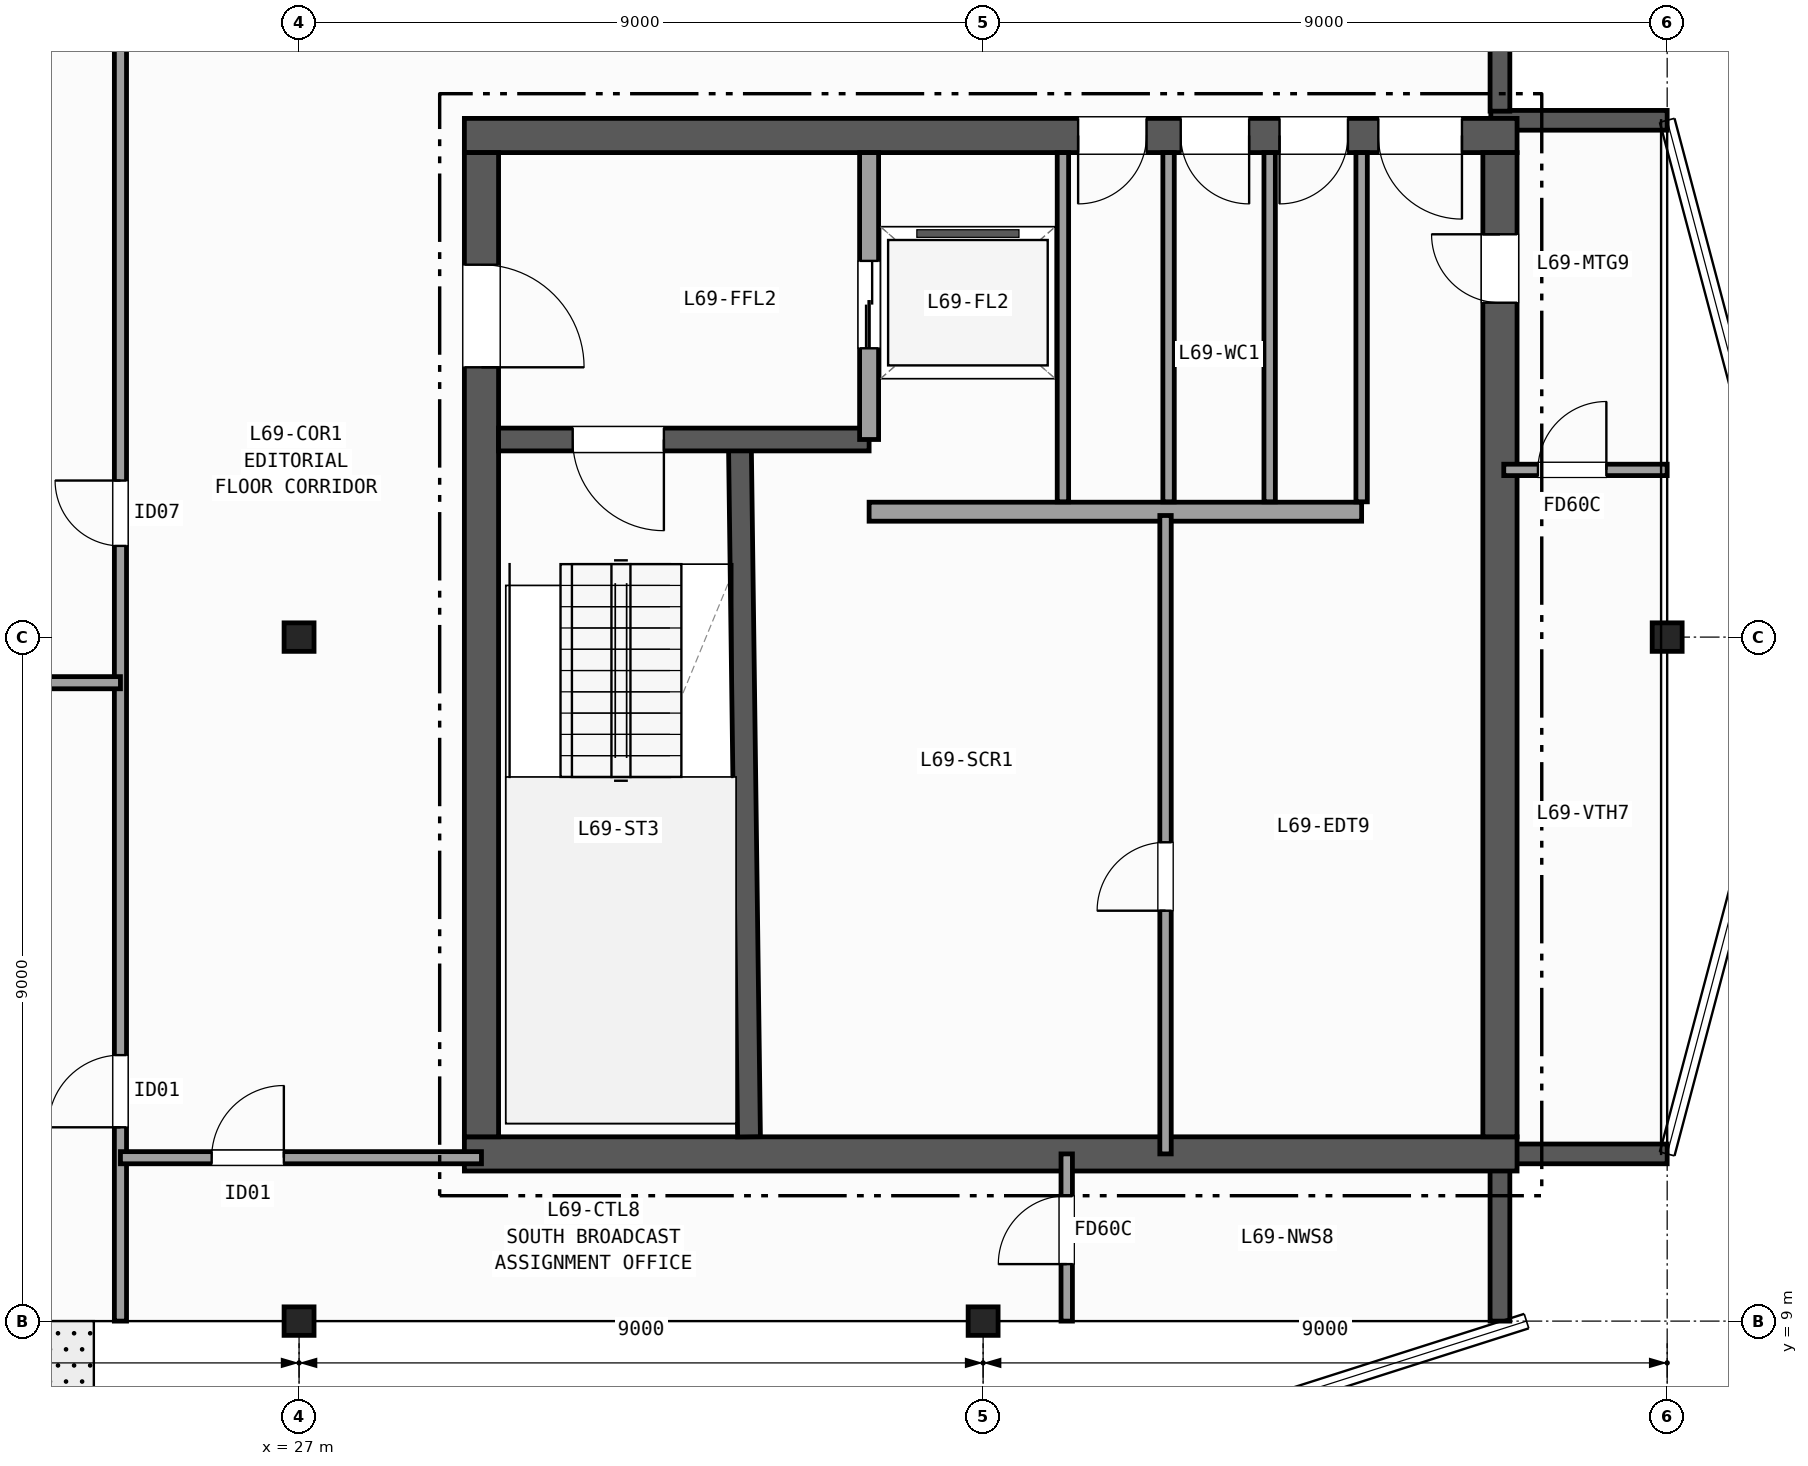
"""IFC4 building model, lengths in metres.
Left out: names, types, materials, properties, quantities, classifications, styles, units other than length and angle.
Written with IfcOpenShell. Run it as: python <this file> out.ifc"""

import sys

from ifc_helpers import new_model, si_unit, direction, frame, frame_2d, origin, origin_2d, place, context, subcontext, project, spatial, rectangle, i_section, extrude, element, fill, save


model = new_model("IFC4")
c1 = context("Model", 3, precision=1e-05, world=origin(), true_north=direction((0.0, 1.0)))
c2 = subcontext(c1, "Body", "Model", "MODEL_VIEW")
j1 = project(units=[si_unit("LENGTHUNIT", "METRE"), si_unit("PLANEANGLEUNIT", "RADIAN")], contexts=[c1])
p1 = place(None, origin())
s1 = spatial("IfcSite", under=j1, at=p1, CompositionType="ELEMENT")
p2 = place(p1, origin())
s2 = spatial("IfcBuilding", under=s1, at=p2, CompositionType="ELEMENT")
p3 = place(p2, frame((0.0, 0.0, 274.1)))
s3 = spatial("IfcBuildingStorey", under=s2, at=p3, CompositionType="ELEMENT", Elevation=274.1)
for number, where, z_axis, x_axis in (
    (1, (27.0, 9.0, 0.0), (0.0, 0.0, 1.0), (1.0, 0.0, 0.0)),
    (2, (27.0, 18.0, 0.0), (0.0, 0.0, 1.0), (1.0, 0.0, 0.0)),
    (3, (36.0, 9.0, 0.0), (0.0, 0.0, 1.0), (1.0, 0.0, 0.0)),
    (4, (45.0, 18.0, 0.0), (0.0, 0.0, 1.0), (1.0, 0.0, 0.0)),
):
    element("IfcColumn", number, at=place(p3, frame(where, z_axis=z_axis, x_axis=x_axis)), inside=s3, PredefinedType="COLUMN", context=c2, shape_type="SweptSolid", body=[
        extrude(i_section(OverallWidth=0.394, OverallDepth=0.375, WebThickness=0.017, FlangeThickness=0.028, FilletRadius=0.015, at=origin_2d()), origin(), (0.0, 0.0, 1.0), 3.7),
    ])
p4 = place(p3, frame((42.8, 9.0, 0.0), z_axis=(0.0, 0.0, 1.0), x_axis=(0.0, 1.0, 0.0)))
e5 = element("IfcWall", 5, at=p4, inside=s3, PredefinedType="SOLIDWALL", context=c2, shape_type="SweptSolid", body=[
    extrude(rectangle(XDim=2.08, YDim=0.26, at=frame_2d((1.04, 0.0))), origin(), (0.0, 0.0, 1.0), 3.42),
])
for number, where, z_axis, x_axis in (
    (6, (42.68, 11.2, 0.0), (0.0, 0.0, 1.0), (1.0, 0.0, 0.0)),
    (7, (45.0, 24.8, 0.0), (0.0, 0.0, 1.0), (-1.0, 0.0, 0.0)),
):
    element("IfcWall", number, at=place(p3, frame(where, z_axis=z_axis, x_axis=x_axis)), inside=s3, PredefinedType="SOLIDWALL", context=c2, shape_type="SweptSolid", body=[
        extrude(rectangle(XDim=2.32, YDim=0.26, at=frame_2d((1.16, 0.0))), origin(), (0.0, 0.0, 1.0), 3.42),
    ])
p5 = place(p3, frame((42.8, 24.92, 0.0), z_axis=(0.0, 0.0, 1.0), x_axis=(0.0, 1.0, 0.0)))
e8 = element("IfcWall", 8, at=p5, inside=s3, PredefinedType="SOLIDWALL", context=c2, shape_type="SweptSolid", body=[
    extrude(rectangle(XDim=2.08, YDim=0.26, at=frame_2d((1.04, 0.0))), origin(), (0.0, 0.0, 1.0), 3.42),
])
p6 = place(p3, frame((29.175, 11.2, 0.0), z_axis=(0.0, 0.0, 1.0), x_axis=(1.0, 0.0, 0.0)))
e9 = element("IfcWall", 9, at=p6, inside=s3, PredefinedType="SHEAR", context=c2, shape_type="SweptSolid", body=[
    extrude(rectangle(XDim=13.85, YDim=0.45, at=frame_2d((6.925, 0.0))), origin(), (0.0, 0.0, 1.0), 3.42),
])
p7 = place(p3, frame((43.025, 24.6, 0.0), z_axis=(0.0, 0.0, 1.0), x_axis=(-1.0, 0.0, 0.0)))
e10 = element("IfcWall", 10, at=p7, inside=s3, PredefinedType="SHEAR", context=c2, shape_type="SweptSolid", body=[
    extrude(rectangle(XDim=13.85, YDim=0.45, at=frame_2d((6.925, 0.0))), origin(), (0.0, 0.0, 1.0), 3.42),
])
p8 = place(p7, frame((0.725, 0.0, 0.0)))
e11 = element("IfcOpeningElement", 11, at=p8, cuts=e10, PredefinedType="OPENING", context=c2, shape_type="SweptSolid", body=[
    extrude(rectangle(XDim=1.1, YDim=2.15, at=frame_2d((0.55, 1.075))), frame((0.0, 0.235, 0.0), z_axis=(0.0, -1.0, 0.0), x_axis=(1.0, 0.0, 0.0)), (0.0, 0.0, 1.0), 0.47),
])
p9 = place(p7, frame((2.225, 0.0, 0.0)))
e12 = element("IfcOpeningElement", 12, at=p9, cuts=e10, PredefinedType="OPENING", context=c2, shape_type="SweptSolid", body=[
    extrude(rectangle(XDim=0.9, YDim=2.1, at=frame_2d((0.45, 1.05))), frame((0.0, 0.235, 0.0), z_axis=(0.0, -1.0, 0.0), x_axis=(1.0, 0.0, 0.0)), (0.0, 0.0, 1.0), 0.47),
])
p10 = place(p7, frame((3.525, 0.0, 0.0)))
e13 = element("IfcOpeningElement", 13, at=p10, cuts=e10, PredefinedType="OPENING", context=c2, shape_type="SweptSolid", body=[
    extrude(rectangle(XDim=0.9, YDim=2.1, at=frame_2d((0.45, 1.05))), frame((0.0, 0.235, 0.0), z_axis=(0.0, -1.0, 0.0), x_axis=(1.0, 0.0, 0.0)), (0.0, 0.0, 1.0), 0.47),
])
p11 = place(p7, frame((4.875, 0.0, 0.0)))
e14 = element("IfcOpeningElement", 14, at=p11, cuts=e10, PredefinedType="OPENING", context=c2, shape_type="SweptSolid", body=[
    extrude(rectangle(XDim=0.9, YDim=2.1, at=frame_2d((0.45, 1.05))), frame((0.0, 0.235, 0.0), z_axis=(0.0, -1.0, 0.0), x_axis=(1.0, 0.0, 0.0)), (0.0, 0.0, 1.0), 0.47),
])
p12 = place(p3, frame((29.4, 24.375, 0.0), z_axis=(0.0, 0.0, 1.0), x_axis=(0.0, -1.0, 0.0)))
e15 = element("IfcWall", 15, at=p12, inside=s3, PredefinedType="SHEAR", context=c2, shape_type="SweptSolid", body=[
    extrude(rectangle(XDim=12.95, YDim=0.45, at=frame_2d((6.475, 0.0))), origin(), (0.0, 0.0, 1.0), 3.42),
])
p13 = place(p12, frame((1.475, 0.0, 0.0)))
e16 = element("IfcOpeningElement", 16, at=p13, cuts=e15, PredefinedType="OPENING", context=c2, shape_type="SweptSolid", body=[
    extrude(rectangle(XDim=1.35, YDim=2.15, at=frame_2d((0.675, 1.075))), frame((0.0, 0.235, 0.0), z_axis=(0.0, -1.0, 0.0), x_axis=(1.0, 0.0, 0.0)), (0.0, 0.0, 1.0), 0.47),
])
p14 = place(p3, frame((42.8, 11.425, 0.0), z_axis=(0.0, 0.0, 1.0), x_axis=(0.0, 1.0, 0.0)))
e17 = element("IfcWall", 17, at=p14, inside=s3, PredefinedType="SHEAR", context=c2, shape_type="SweptSolid", body=[
    extrude(rectangle(XDim=12.95, YDim=0.45, at=frame_2d((6.475, 0.0))), origin(), (0.0, 0.0, 1.0), 3.42),
])
p15 = place(p14, frame((10.975, 0.0, 0.0)))
e18 = element("IfcOpeningElement", 18, at=p15, cuts=e17, PredefinedType="OPENING", context=c2, shape_type="SweptSolid", body=[
    extrude(rectangle(XDim=0.9, YDim=2.1, at=frame_2d((0.45, 1.05))), frame((0.0, 0.235, 0.0), z_axis=(0.0, -1.0, 0.0), x_axis=(1.0, 0.0, 0.0)), (0.0, 0.0, 1.0), 0.47),
])
p16 = place(p3, frame((32.92, 11.425, 0.0), z_axis=(0.0, 0.0, 1.0), x_axis=(-0.013135638869, 0.999913723774, 0.0)))
e19 = element("IfcWall", 19, at=p16, inside=s3, PredefinedType="SHEAR", context=c2, shape_type="SweptSolid", body=[
    extrude(rectangle(XDim=9.126, YDim=0.3, at=frame_2d((4.563, 0.0))), origin(), (0.0, 0.0, 1.0), 3.42),
])
p17 = place(p3, frame((34.5, 20.6, 0.0), z_axis=(0.0, 0.0, 1.0), x_axis=(-1.0, 0.0, 0.0)))
e20 = element("IfcWall", 20, at=p17, inside=s3, PredefinedType="SHEAR", context=c2, shape_type="SweptSolid", body=[
    extrude(rectangle(XDim=4.875, YDim=0.3, at=frame_2d((2.438, 0.0))), origin(), (0.0, 0.0, 1.0), 3.42),
])
p18 = place(p17, frame((2.7, 0.0, 0.0)))
e21 = element("IfcOpeningElement", 21, at=p18, cuts=e20, PredefinedType="OPENING", context=c2, shape_type="SweptSolid", body=[
    extrude(rectangle(XDim=1.2, YDim=2.15, at=frame_2d((0.6, 1.075))), frame((0.0, 0.16, 0.0), z_axis=(0.0, -1.0, 0.0), x_axis=(1.0, 0.0, 0.0)), (0.0, 0.0, 1.0), 0.32),
])
p19 = place(p3, frame((34.5, 20.6, 0.0), z_axis=(0.0, 0.0, 1.0), x_axis=(0.0, 1.0, 0.0)))
e22 = element("IfcWall", 22, at=p19, inside=s3, PredefinedType="PARTITIONING", context=c2, shape_type="SweptSolid", body=[
    extrude(rectangle(XDim=3.775, YDim=0.25, at=frame_2d((1.887, 0.0))), origin(), (0.0, 0.0, 1.0), 3.42),
])
p20 = place(p19, frame((1.2, 0.0, 0.0)))
e23 = element("IfcOpeningElement", 23, at=p20, cuts=e22, PredefinedType="OPENING", context=c2, shape_type="SweptSolid", body=[
    extrude(rectangle(XDim=1.15, YDim=2.15, at=frame_2d((0.575, 1.075))), frame((0.0, 0.135, 0.0), z_axis=(0.0, -1.0, 0.0), x_axis=(1.0, 0.0, 0.0)), (0.0, 0.0, 1.0), 0.27),
])
p21 = place(p3, frame((34.5, 19.65, 0.0), z_axis=(0.0, 0.0, 1.0), x_axis=(1.0, 0.0, 0.0)))
e24 = element("IfcWall", 24, at=p21, inside=s3, PredefinedType="PARTITIONING", context=c2, shape_type="SweptSolid", body=[
    extrude(rectangle(XDim=6.48, YDim=0.25, at=frame_2d((3.24, 0.0))), origin(), (0.0, 0.0, 1.0), 3.42),
])
p22 = place(p3, frame((38.4, 11.2, 0.0), z_axis=(0.0, 0.0, 1.0), x_axis=(0.0, 1.0, 0.0)))
e25 = element("IfcWall", 25, at=p22, inside=s3, PredefinedType="PARTITIONING", context=c2, shape_type="SweptSolid", body=[
    extrude(rectangle(XDim=8.4, YDim=0.15, at=frame_2d((4.2, 0.0))), origin(), (0.0, 0.0, 1.0), 3.42),
])
p23 = place(p22, frame((3.2, 0.0, 0.0)))
e26 = element("IfcOpeningElement", 26, at=p23, cuts=e25, PredefinedType="OPENING", context=c2, shape_type="SweptSolid", body=[
    extrude(rectangle(XDim=0.9, YDim=2.1, at=frame_2d((0.45, 1.05))), frame((0.0, 0.085, 0.0), z_axis=(0.0, -1.0, 0.0), x_axis=(1.0, 0.0, 0.0)), (0.0, 0.0, 1.0), 0.17),
])
for number, where, z_axis, x_axis in (
    (27, (37.05, 19.78, 0.0), (0.0, 0.0, 1.0), (0.0, 1.0, 0.0)),
    (28, (38.44, 19.78, 0.0), (0.0, 0.0, 1.0), (0.0, 1.0, 0.0)),
    (29, (39.77, 19.78, 0.0), (0.0, 0.0, 1.0), (0.0, 1.0, 0.0)),
    (30, (40.98, 19.78, 0.0), (0.0, 0.0, 1.0), (0.0, 1.0, 0.0)),
):
    element("IfcWall", number, at=place(p3, frame(where, z_axis=z_axis, x_axis=x_axis)), inside=s3, PredefinedType="PARTITIONING", context=c2, shape_type="SweptSolid", body=[
        extrude(rectangle(XDim=4.595, YDim=0.15, at=frame_2d((2.297, 0.0))), origin(), (0.0, 0.0, 1.0), 3.42),
    ])
p24 = place(p3, frame((24.65, 9.0, 0.0), z_axis=(0.0, 0.0, 1.0), x_axis=(0.0, 1.0, 0.0)))
e31 = element("IfcWall", 31, at=p24, inside=s3, PredefinedType="PARTITIONING", context=c2, shape_type="SweptSolid", body=[
    extrude(rectangle(XDim=19.2, YDim=0.16, at=frame_2d((9.6, 0.0))), origin(), (0.0, 0.0, 1.0), 2.707),
])
p25 = place(p24, frame((10.2, 0.0, 0.0)))
e32 = element("IfcOpeningElement", 32, at=p25, cuts=e31, PredefinedType="OPENING", context=c2, shape_type="SweptSolid", body=[
    extrude(rectangle(XDim=0.86, YDim=2.05, at=frame_2d((0.43, 1.025))), frame((0.0, 0.09, 0.0), z_axis=(0.0, -1.0, 0.0), x_axis=(1.0, 0.0, 0.0)), (0.0, 0.0, 1.0), 0.18),
])
p26 = place(p24, frame((2.55, 0.0, 0.0)))
e33 = element("IfcOpeningElement", 33, at=p26, cuts=e31, PredefinedType="OPENING", context=c2, shape_type="SweptSolid", body=[
    extrude(rectangle(XDim=0.95, YDim=2.1, at=frame_2d((0.475, 1.05))), frame((0.0, 0.09, 0.0), z_axis=(0.0, -1.0, 0.0), x_axis=(1.0, 0.0, 0.0)), (0.0, 0.0, 1.0), 0.18),
])
p27 = place(p3, frame((18.0, 17.4, 0.0), z_axis=(0.0, 0.0, 1.0), x_axis=(1.0, 0.0, 0.0)))
e34 = element("IfcWall", 34, at=p27, inside=s3, PredefinedType="PARTITIONING", context=c2, shape_type="SweptSolid", body=[
    extrude(rectangle(XDim=6.65, YDim=0.16, at=frame_2d((3.325, 0.0))), origin(), (0.0, 0.0, 1.0), 2.789),
])
p28 = place(p3, frame((24.65, 11.15, 0.0), z_axis=(0.0, 0.0, 1.0), x_axis=(1.0, 0.0, 0.0)))
e35 = element("IfcWall", 35, at=p28, inside=s3, PredefinedType="PARTITIONING", context=c2, shape_type="SweptSolid", body=[
    extrude(rectangle(XDim=4.75, YDim=0.16, at=frame_2d((2.375, 0.0))), origin(), (0.0, 0.0, 1.0), 2.792),
])
p29 = place(p28, frame((1.2, 0.0, 0.0)))
e36 = element("IfcOpeningElement", 36, at=p29, cuts=e35, PredefinedType="OPENING", context=c2, shape_type="SweptSolid", body=[
    extrude(rectangle(XDim=0.95, YDim=2.1, at=frame_2d((0.475, 1.05))), frame((0.0, 0.09, 0.0), z_axis=(0.0, -1.0, 0.0), x_axis=(1.0, 0.0, 0.0)), (0.0, 0.0, 1.0), 0.18),
])
p30 = place(p3, frame((37.1, 9.0, 0.0), z_axis=(0.0, 0.0, 1.0), x_axis=(0.0, 1.0, 0.0)))
e37 = element("IfcWall", 37, at=p30, inside=s3, PredefinedType="PARTITIONING", context=c2, shape_type="SweptSolid", body=[
    extrude(rectangle(XDim=2.2, YDim=0.15, at=frame_2d((1.1, 0.0))), origin(), (0.0, 0.0, 1.0), 3.42),
])
p31 = place(p30, frame((0.75, 0.0, 0.0)))
e38 = element("IfcOpeningElement", 38, at=p31, cuts=e37, PredefinedType="OPENING", context=c2, shape_type="SweptSolid", body=[
    extrude(rectangle(XDim=0.9, YDim=2.1, at=frame_2d((0.45, 1.05))), frame((0.0, 0.085, 0.0), z_axis=(0.0, -1.0, 0.0), x_axis=(1.0, 0.0, 0.0)), (0.0, 0.0, 1.0), 0.17),
])
p32 = place(p3, frame((42.85, 20.2, 0.0), z_axis=(0.0, 0.0, 1.0), x_axis=(1.0, 0.0, 0.0)))
e39 = element("IfcWall", 39, at=p32, inside=s3, PredefinedType="PARTITIONING", context=c2, shape_type="SweptSolid", body=[
    extrude(rectangle(XDim=2.15, YDim=0.15, at=frame_2d((1.075, 0.0))), origin(), (0.0, 0.0, 1.0), 3.42),
])
p33 = place(p32, frame((0.45, 0.0, 0.0)))
e40 = element("IfcOpeningElement", 40, at=p33, cuts=e39, PredefinedType="OPENING", context=c2, shape_type="SweptSolid", body=[
    extrude(rectangle(XDim=0.9, YDim=2.1, at=frame_2d((0.45, 1.05))), frame((0.0, 0.085, 0.0), z_axis=(0.0, -1.0, 0.0), x_axis=(1.0, 0.0, 0.0)), (0.0, 0.0, 1.0), 0.17),
])
p34 = place(p18, origin())
e41 = element("IfcDoor", 41, at=p34, inside=s3, OperationType="SINGLE_SWING_LEFT", PredefinedType="DOOR", context=c2, shape_type="SweptSolid", body=[
    extrude(rectangle(XDim=1.2, YDim=2.15, at=frame_2d((0.6, 1.075))), frame((0.0, 0.025, 0.0), z_axis=(0.0, -1.0, 0.0), x_axis=(1.0, 0.0, 0.0)), (0.0, 0.0, 1.0), 0.05),
])
fill(e21, e41)
p35 = place(p13, origin())
e42 = element("IfcDoor", 42, at=p35, inside=s3, OperationType="SINGLE_SWING_RIGHT", PredefinedType="DOOR", context=c2, shape_type="SweptSolid", body=[
    extrude(rectangle(XDim=1.35, YDim=2.15, at=frame_2d((0.675, 1.075))), frame((0.0, 0.025, 0.0), z_axis=(0.0, -1.0, 0.0), x_axis=(1.0, 0.0, 0.0)), (0.0, 0.0, 1.0), 0.05),
])
fill(e16, e42)
p36 = place(p15, origin())
e43 = element("IfcDoor", 43, at=p36, inside=s3, OperationType="SINGLE_SWING_RIGHT", PredefinedType="DOOR", context=c2, shape_type="SweptSolid", body=[
    extrude(rectangle(XDim=0.9, YDim=2.1, at=frame_2d((0.45, 1.05))), frame((0.0, 0.025, 0.0), z_axis=(0.0, -1.0, 0.0), x_axis=(1.0, 0.0, 0.0)), (0.0, 0.0, 1.0), 0.05),
])
fill(e18, e43)
p37 = place(p8, origin())
e44 = element("IfcDoor", 44, at=p37, inside=s3, OperationType="SINGLE_SWING_LEFT", PredefinedType="DOOR", context=c2, shape_type="SweptSolid", body=[
    extrude(rectangle(XDim=1.1, YDim=2.15, at=frame_2d((0.55, 1.075))), frame((0.0, 0.025, 0.0), z_axis=(0.0, -1.0, 0.0), x_axis=(1.0, 0.0, 0.0)), (0.0, 0.0, 1.0), 0.05),
])
fill(e11, e44)
p38 = place(p9, origin())
e45 = element("IfcDoor", 45, at=p38, inside=s3, OperationType="SINGLE_SWING_RIGHT", PredefinedType="DOOR", context=c2, shape_type="SweptSolid", body=[
    extrude(rectangle(XDim=0.9, YDim=2.1, at=frame_2d((0.45, 1.05))), frame((0.0, 0.025, 0.0), z_axis=(0.0, -1.0, 0.0), x_axis=(1.0, 0.0, 0.0)), (0.0, 0.0, 1.0), 0.05),
])
fill(e12, e45)
p39 = place(p10, origin())
e46 = element("IfcDoor", 46, at=p39, inside=s3, OperationType="SINGLE_SWING_LEFT", PredefinedType="DOOR", context=c2, shape_type="SweptSolid", body=[
    extrude(rectangle(XDim=0.9, YDim=2.1, at=frame_2d((0.45, 1.05))), frame((0.0, 0.025, 0.0), z_axis=(0.0, -1.0, 0.0), x_axis=(1.0, 0.0, 0.0)), (0.0, 0.0, 1.0), 0.05),
])
fill(e13, e46)
p40 = place(p11, origin())
e47 = element("IfcDoor", 47, at=p40, inside=s3, OperationType="SINGLE_SWING_RIGHT", PredefinedType="DOOR", context=c2, shape_type="SweptSolid", body=[
    extrude(rectangle(XDim=0.9, YDim=2.1, at=frame_2d((0.45, 1.05))), frame((0.0, 0.025, 0.0), z_axis=(0.0, -1.0, 0.0), x_axis=(1.0, 0.0, 0.0)), (0.0, 0.0, 1.0), 0.05),
])
fill(e14, e47)
p41 = place(p20, origin())
e48 = element("IfcDoor", 48, at=p41, inside=s3, OperationType="DOUBLE_DOOR_SLIDING", PredefinedType="DOOR", context=c2, shape_type="SweptSolid", body=[
    extrude(rectangle(XDim=1.15, YDim=2.15, at=frame_2d((0.575, 1.075))), frame((0.0, 0.025, 0.0), z_axis=(0.0, -1.0, 0.0), x_axis=(1.0, 0.0, 0.0)), (0.0, 0.0, 1.0), 0.05),
])
fill(e23, e48)
p42 = place(p23, origin())
e49 = element("IfcDoor", 49, at=p42, inside=s3, OperationType="SINGLE_SWING_LEFT", PredefinedType="DOOR", context=c2, shape_type="SweptSolid", body=[
    extrude(rectangle(XDim=0.9, YDim=2.1, at=frame_2d((0.45, 1.05))), frame((0.0, 0.025, 0.0), z_axis=(0.0, -1.0, 0.0), x_axis=(1.0, 0.0, 0.0)), (0.0, 0.0, 1.0), 0.05),
])
fill(e26, e49)
p43 = place(p25, origin())
e50 = element("IfcDoor", 50, at=p43, inside=s3, OperationType="SINGLE_SWING_RIGHT", PredefinedType="DOOR", context=c2, shape_type="SweptSolid", body=[
    extrude(rectangle(XDim=0.86, YDim=2.05, at=frame_2d((0.43, 1.025))), frame((0.0, 0.025, 0.0), z_axis=(0.0, -1.0, 0.0), x_axis=(1.0, 0.0, 0.0)), (0.0, 0.0, 1.0), 0.05),
])
fill(e32, e50)
p44 = place(p26, origin())
e51 = element("IfcDoor", 51, at=p44, inside=s3, OperationType="SINGLE_SWING_LEFT", PredefinedType="DOOR", context=c2, shape_type="SweptSolid", body=[
    extrude(rectangle(XDim=0.95, YDim=2.1, at=frame_2d((0.475, 1.05))), frame((0.0, 0.025, 0.0), z_axis=(0.0, -1.0, 0.0), x_axis=(1.0, 0.0, 0.0)), (0.0, 0.0, 1.0), 0.05),
])
fill(e33, e51)
p45 = place(p29, origin())
e52 = element("IfcDoor", 52, at=p45, inside=s3, OperationType="SINGLE_SWING_RIGHT", PredefinedType="DOOR", context=c2, shape_type="SweptSolid", body=[
    extrude(rectangle(XDim=0.95, YDim=2.1, at=frame_2d((0.475, 1.05))), frame((0.0, 0.025, 0.0), z_axis=(0.0, -1.0, 0.0), x_axis=(1.0, 0.0, 0.0)), (0.0, 0.0, 1.0), 0.05),
])
fill(e36, e52)
p46 = place(p31, origin())
e53 = element("IfcDoor", 53, at=p46, inside=s3, OperationType="SINGLE_SWING_LEFT", PredefinedType="DOOR", context=c2, shape_type="SweptSolid", body=[
    extrude(rectangle(XDim=0.9, YDim=2.1, at=frame_2d((0.45, 1.05))), frame((0.0, 0.025, 0.0), z_axis=(0.0, -1.0, 0.0), x_axis=(1.0, 0.0, 0.0)), (0.0, 0.0, 1.0), 0.05),
])
fill(e38, e53)
p47 = place(p33, origin())
e54 = element("IfcDoor", 54, at=p47, inside=s3, OperationType="SINGLE_SWING_RIGHT", PredefinedType="DOOR", context=c2, shape_type="SweptSolid", body=[
    extrude(rectangle(XDim=0.9, YDim=2.1, at=frame_2d((0.45, 1.05))), frame((0.0, 0.025, 0.0), z_axis=(0.0, -1.0, 0.0), x_axis=(1.0, 0.0, 0.0)), (0.0, 0.0, 1.0), 0.05),
])
fill(e40, e54)
save(model, sys.argv[1])
